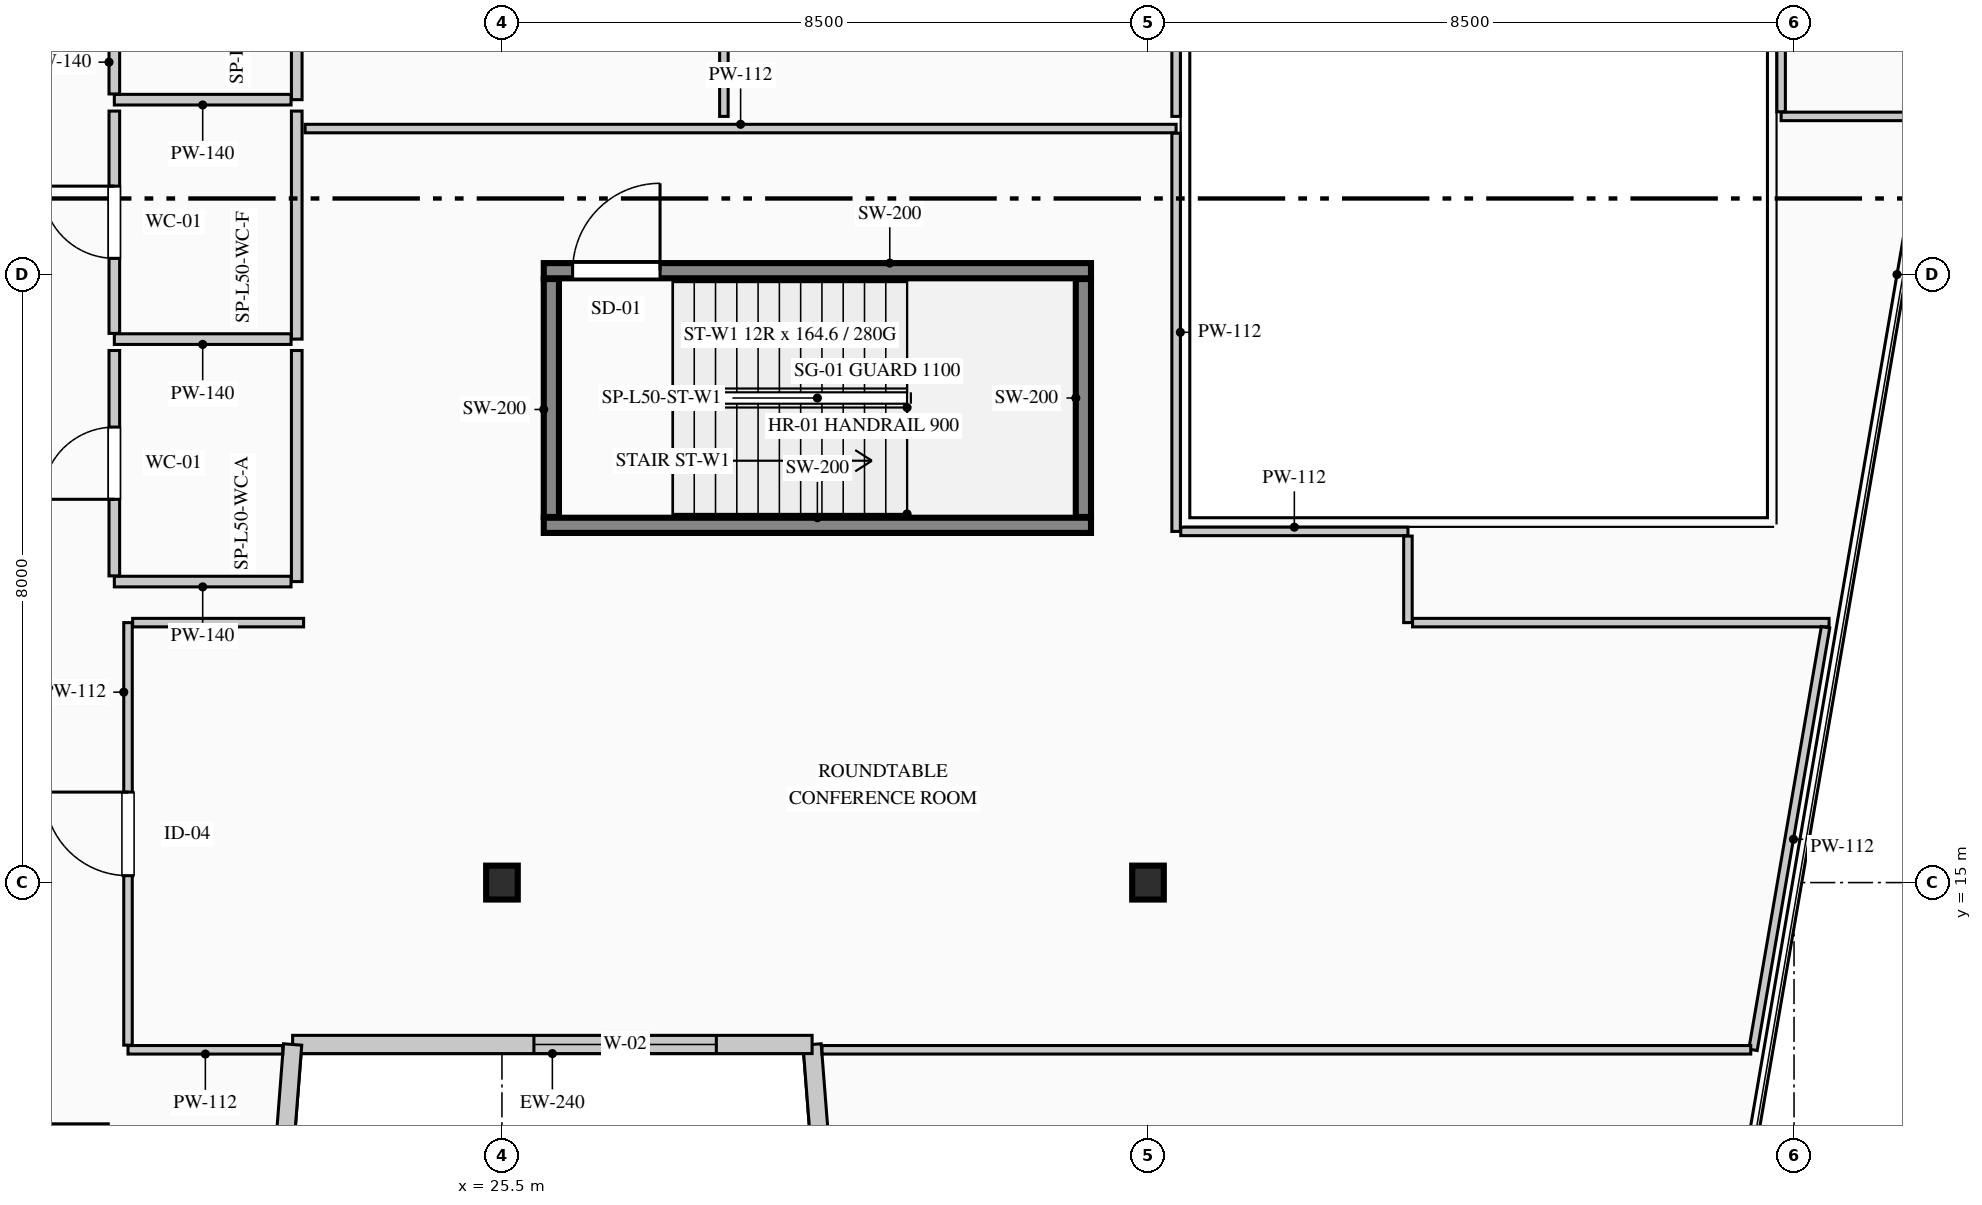
"""IFC4 building model, lengths in metres.
Left out: names, types, materials, properties, quantities, classifications, styles, units other than length and angle.
Written with IfcOpenShell. Run it as: python <this file> out.ifc"""

import sys

from ifc_helpers import new_model, si_unit, direction, frame, frame_2d, origin, origin_2d, place, context, subcontext, project, spatial, rectangle, i_section, extrude, element, fill, save


model = new_model("IFC4")
c1 = context("Model", 3, precision=1e-05, world=origin(), true_north=direction((0.0, 1.0)))
c2 = subcontext(c1, "Body", "Model", "MODEL_VIEW")
j1 = project(units=[si_unit("LENGTHUNIT", "METRE"), si_unit("PLANEANGLEUNIT", "RADIAN")], contexts=[c1])
p1 = place(None, origin())
s1 = spatial("IfcSite", under=j1, at=p1, CompositionType="ELEMENT")
p2 = place(p1, origin())
s2 = spatial("IfcBuilding", under=s1, at=p2, CompositionType="ELEMENT")
p3 = place(p2, frame((0.0, 0.0, 211.4)))
s3 = spatial("IfcBuildingStorey", under=s2, at=p3, CompositionType="ELEMENT", Elevation=211.4)
p4 = place(p3, frame((26.05, 19.7, 0.0), z_axis=(0.0, 0.0, 1.0), x_axis=(1.0, 0.0, 0.0)))
e1 = element("IfcWall", 1, at=p4, inside=s3, PredefinedType="SHEAR", context=c2, shape_type="SweptSolid", body=[
    extrude(rectangle(XDim=7.2, YDim=0.2, at=frame_2d((3.6, 0.0))), origin(), (0.0, 0.0, 1.0), 3.95),
])
p5 = place(p3, frame((26.05, 23.05, 0.0), z_axis=(0.0, 0.0, 1.0), x_axis=(1.0, 0.0, 0.0)))
e2 = element("IfcWall", 2, at=p5, inside=s3, PredefinedType="SHEAR", context=c2, shape_type="SweptSolid", body=[
    extrude(rectangle(XDim=7.2, YDim=0.2, at=frame_2d((3.6, 0.0))), origin(), (0.0, 0.0, 1.0), 3.95),
])
p6 = place(p5, frame((0.38, 0.0, 0.0)))
e3 = element("IfcOpeningElement", 3, at=p6, cuts=e2, PredefinedType="OPENING", context=c2, shape_type="SweptSolid", body=[
    extrude(rectangle(XDim=1.15, YDim=2.2, at=frame_2d((0.575, 1.1))), frame((0.0, 0.11, 0.0), z_axis=(0.0, -1.0, 0.0), x_axis=(1.0, 0.0, 0.0)), (0.0, 0.0, 1.0), 0.22),
])
for number, where, z_axis, x_axis in (
    (4, (26.15, 19.81, 0.0), (0.0, 0.0, 1.0), (0.0, 1.0, 0.0)),
    (5, (33.15, 19.81, 0.0), (0.0, 0.0, 1.0), (0.0, 1.0, 0.0)),
):
    element("IfcWall", number, at=place(p3, frame(where, z_axis=z_axis, x_axis=x_axis)), inside=s3, PredefinedType="SHEAR", context=c2, shape_type="SweptSolid", body=[
        extrude(rectangle(XDim=3.13, YDim=0.2, at=frame_2d((1.565, 0.0))), origin(), (0.0, 0.0, 1.0), 3.95),
    ])
for number, where, z_axis, x_axis in (
    (6, (25.5, 15.0, 0.0), (0.0, 0.0, 1.0), (1.0, 0.0, 0.0)),
    (7, (34.0, 15.0, 0.0), (0.0, 0.0, 1.0), (1.0, 0.0, 0.0)),
):
    element("IfcColumn", number, at=place(p3, frame(where, z_axis=z_axis, x_axis=x_axis)), inside=s3, PredefinedType="COLUMN", context=c2, shape_type="SweptSolid", body=[
        extrude(i_section(OverallWidth=0.416, OverallDepth=0.446, WebThickness=0.039, FlangeThickness=0.063, FilletRadius=0.015, at=origin_2d()), origin(), (0.0, 0.0, 1.0), 3.95),
    ])
p7 = place(p3, frame((30.381, 2.62, 0.0), z_axis=(0.0, 0.0, 1.0), x_axis=(-0.077816860153, 0.996967670627, 0.0)))
e8 = element("IfcWall", 8, at=p7, inside=s3, PredefinedType="STANDARD", context=c2, shape_type="SweptSolid", body=[
    extrude(rectangle(XDim=10.281, YDim=0.24, at=frame_2d((5.141, 0.0))), origin(), (0.0, 0.0, 1.0), 3.7),
])
p8 = place(p7, frame((5.38, 0.0, 0.9)))
e9 = element("IfcOpeningElement", 9, at=p8, cuts=e8, PredefinedType="OPENING", context=c2, shape_type="SweptSolid", body=[
    extrude(rectangle(XDim=2.4, YDim=2.1, at=frame_2d((1.2, 1.05))), frame((0.0, 0.13, 0.0), z_axis=(0.0, -1.0, 0.0), x_axis=(1.0, 0.0, 0.0)), (0.0, 0.0, 1.0), 0.26),
])
p9 = place(p3, frame((29.581, 12.87, 0.0), z_axis=(0.0, 0.0, 1.0), x_axis=(-1.0, 0.0, 0.0)))
e10 = element("IfcWall", 10, at=p9, inside=s3, PredefinedType="STANDARD", context=c2, shape_type="SweptSolid", body=[
    extrude(rectangle(XDim=6.834, YDim=0.24, at=frame_2d((3.417, 0.0))), origin(), (0.0, 0.0, 1.0), 3.7),
])
p10 = place(p9, frame((1.26, 0.0, 0.9)))
e11 = element("IfcOpeningElement", 11, at=p10, cuts=e10, PredefinedType="OPENING", context=c2, shape_type="SweptSolid", body=[
    extrude(rectangle(XDim=2.4, YDim=2.1, at=frame_2d((1.2, 1.05))), frame((0.0, 0.13, 0.0), z_axis=(0.0, -1.0, 0.0), x_axis=(1.0, 0.0, 0.0)), (0.0, 0.0, 1.0), 0.26),
])
p11 = place(p3, frame((22.746, 12.87, 0.0), z_axis=(0.0, 0.0, 1.0), x_axis=(-0.077816860153, -0.996967670627, 0.0)))
e12 = element("IfcWall", 12, at=p11, inside=s3, PredefinedType="STANDARD", context=c2, shape_type="SweptSolid", body=[
    extrude(rectangle(XDim=10.281, YDim=0.24, at=frame_2d((5.141, 0.0))), origin(), (0.0, 0.0, 1.0), 3.7),
])
p12 = place(p11, frame((2.501, 0.0, 0.9)))
e13 = element("IfcOpeningElement", 13, at=p12, cuts=e12, PredefinedType="OPENING", context=c2, shape_type="SweptSolid", body=[
    extrude(rectangle(XDim=2.4, YDim=2.1, at=frame_2d((1.2, 1.05))), frame((0.0, 0.13, 0.0), z_axis=(0.0, -1.0, 0.0), x_axis=(1.0, 0.0, 0.0)), (0.0, 0.0, 1.0), 0.26),
])
p13 = place(p3, frame((22.8, 28.95, 0.0), z_axis=(0.0, 0.0, 1.0), x_axis=(0.0, -1.0, 0.0)))
e14 = element("IfcWall", 14, at=p13, inside=s3, PredefinedType="PARTITIONING", context=c2, shape_type="SweptSolid", body=[
    extrude(rectangle(XDim=3.65, YDim=0.14, at=frame_2d((1.825, 0.0))), origin(), (0.0, 0.0, 1.0), 3.325),
])
p14 = place(p3, frame((22.725, 25.3, 0.0), z_axis=(0.0, 0.0, 1.0), x_axis=(-1.0, 0.0, 0.0)))
e15 = element("IfcWall", 15, at=p14, inside=s3, PredefinedType="PARTITIONING", context=c2, shape_type="SweptSolid", body=[
    extrude(rectangle(XDim=2.325, YDim=0.14, at=frame_2d((1.163, 0.0))), origin(), (0.0, 0.0, 1.0), 3.7),
])
p15 = place(p3, frame((20.4, 25.375, 0.0), z_axis=(0.0, 0.0, 1.0), x_axis=(0.0, 1.0, 0.0)))
e16 = element("IfcWall", 16, at=p15, inside=s3, PredefinedType="PARTITIONING", context=c2, shape_type="SweptSolid", body=[
    extrude(rectangle(XDim=3.575, YDim=0.14, at=frame_2d((1.788, 0.0))), origin(), (0.0, 0.0, 1.0), 3.7),
])
p16 = place(p15, frame((1.312, 0.0, 0.0)))
e17 = element("IfcOpeningElement", 17, at=p16, cuts=e16, PredefinedType="OPENING", context=c2, shape_type="SweptSolid", body=[
    extrude(rectangle(XDim=0.95, YDim=2.15, at=frame_2d((0.475, 1.075))), frame((0.0, 0.08, 0.0), z_axis=(0.0, -1.0, 0.0), x_axis=(1.0, 0.0, 0.0)), (0.0, 0.0, 1.0), 0.16),
])
p17 = place(p3, frame((22.8, 25.15, 0.0), z_axis=(0.0, 0.0, 1.0), x_axis=(0.0, -1.0, 0.0)))
e18 = element("IfcWall", 18, at=p17, inside=s3, PredefinedType="PARTITIONING", context=c2, shape_type="SweptSolid", body=[
    extrude(rectangle(XDim=3.0, YDim=0.14, at=frame_2d((1.5, 0.0))), origin(), (0.0, 0.0, 1.0), 3.325),
])
p18 = place(p3, frame((22.725, 22.15, 0.0), z_axis=(0.0, 0.0, 1.0), x_axis=(-1.0, 0.0, 0.0)))
e19 = element("IfcWall", 19, at=p18, inside=s3, PredefinedType="PARTITIONING", context=c2, shape_type="SweptSolid", body=[
    extrude(rectangle(XDim=2.325, YDim=0.14, at=frame_2d((1.163, 0.0))), origin(), (0.0, 0.0, 1.0), 3.7),
])
p19 = place(p3, frame((20.4, 22.225, 0.0), z_axis=(0.0, 0.0, 1.0), x_axis=(0.0, 1.0, 0.0)))
e20 = element("IfcWall", 20, at=p19, inside=s3, PredefinedType="PARTITIONING", context=c2, shape_type="SweptSolid", body=[
    extrude(rectangle(XDim=2.925, YDim=0.14, at=frame_2d((1.462, 0.0))), origin(), (0.0, 0.0, 1.0), 3.7),
])
p20 = place(p19, frame((0.988, 0.0, 0.0)))
e21 = element("IfcOpeningElement", 21, at=p20, cuts=e20, PredefinedType="OPENING", context=c2, shape_type="SweptSolid", body=[
    extrude(rectangle(XDim=0.95, YDim=2.15, at=frame_2d((0.475, 1.075))), frame((0.0, 0.08, 0.0), z_axis=(0.0, -1.0, 0.0), x_axis=(1.0, 0.0, 0.0)), (0.0, 0.0, 1.0), 0.16),
])
p21 = place(p3, frame((22.8, 22.0, 0.0), z_axis=(0.0, 0.0, 1.0), x_axis=(0.0, -1.0, 0.0)))
e22 = element("IfcWall", 22, at=p21, inside=s3, PredefinedType="PARTITIONING", context=c2, shape_type="SweptSolid", body=[
    extrude(rectangle(XDim=3.04, YDim=0.14, at=frame_2d((1.52, 0.0))), origin(), (0.0, 0.0, 1.0), 3.325),
])
p22 = place(p3, frame((22.725, 18.96, 0.0), z_axis=(0.0, 0.0, 1.0), x_axis=(-1.0, 0.0, 0.0)))
e23 = element("IfcWall", 23, at=p22, inside=s3, PredefinedType="PARTITIONING", context=c2, shape_type="SweptSolid", body=[
    extrude(rectangle(XDim=2.325, YDim=0.14, at=frame_2d((1.163, 0.0))), origin(), (0.0, 0.0, 1.0), 3.7),
])
p23 = place(p3, frame((20.4, 19.035, 0.0), z_axis=(0.0, 0.0, 1.0), x_axis=(0.0, 1.0, 0.0)))
e24 = element("IfcWall", 24, at=p23, inside=s3, PredefinedType="PARTITIONING", context=c2, shape_type="SweptSolid", body=[
    extrude(rectangle(XDim=2.965, YDim=0.14, at=frame_2d((1.482, 0.0))), origin(), (0.0, 0.0, 1.0), 3.7),
])
p24 = place(p23, frame((1.008, 0.0, 0.0)))
e25 = element("IfcOpeningElement", 25, at=p24, cuts=e24, PredefinedType="OPENING", context=c2, shape_type="SweptSolid", body=[
    extrude(rectangle(XDim=0.95, YDim=2.15, at=frame_2d((0.475, 1.075))), frame((0.0, 0.08, 0.0), z_axis=(0.0, -1.0, 0.0), x_axis=(1.0, 0.0, 0.0)), (0.0, 0.0, 1.0), 0.16),
])
p25 = place(p3, frame((11.341, 11.77, 0.0), z_axis=(0.0, 0.0, 1.0), x_axis=(1.0, 0.0, 0.0)))
e26 = element("IfcWall", 26, at=p25, inside=s3, PredefinedType="PARTITIONING", context=c2, shape_type="SweptSolid", body=[
    extrude(rectangle(XDim=8.979, YDim=0.112, at=frame_2d((4.49, 0.0))), origin(), (0.0, 0.0, 1.0), 3.7),
])
p26 = place(p25, frame((3.939, 0.0, 0.0)))
e27 = element("IfcOpeningElement", 27, at=p26, cuts=e26, PredefinedType="OPENING", context=c2, shape_type="SweptSolid", body=[
    extrude(rectangle(XDim=1.1, YDim=2.2, at=frame_2d((0.55, 1.1))), frame((0.0, 0.066, 0.0), z_axis=(0.0, -1.0, 0.0), x_axis=(1.0, 0.0, 0.0)), (0.0, 0.0, 1.0), 0.132),
])
p27 = place(p3, frame((22.615, 12.8, 0.0), z_axis=(0.0, 0.0, 1.0), x_axis=(-1.0, 0.0, 0.0)))
e28 = element("IfcWall", 28, at=p27, inside=s3, PredefinedType="PARTITIONING", context=c2, shape_type="SweptSolid", body=[
    extrude(rectangle(XDim=2.035, YDim=0.112, at=frame_2d((1.018, 0.0))), origin(), (0.0, 0.0, 1.0), 3.7),
])
p28 = place(p3, frame((20.58, 12.861, 0.0), z_axis=(0.0, 0.0, 1.0), x_axis=(0.0, 1.0, 0.0)))
e29 = element("IfcWall", 29, at=p28, inside=s3, PredefinedType="PARTITIONING", context=c2, shape_type="SweptSolid", body=[
    extrude(rectangle(XDim=5.559, YDim=0.112, at=frame_2d((2.779, 0.0))), origin(), (0.0, 0.0, 1.0), 3.7),
])
p29 = place(p28, frame((2.229, 0.0, 0.0)))
e30 = element("IfcOpeningElement", 30, at=p29, cuts=e29, PredefinedType="OPENING", context=c2, shape_type="SweptSolid", body=[
    extrude(rectangle(XDim=1.1, YDim=2.2, at=frame_2d((0.55, 1.1))), frame((0.0, 0.066, 0.0), z_axis=(0.0, -1.0, 0.0), x_axis=(1.0, 0.0, 0.0)), (0.0, 0.0, 1.0), 0.132),
])
p30 = place(p3, frame((20.641, 18.42, 0.0), z_axis=(0.0, 0.0, 1.0), x_axis=(1.0, 0.0, 0.0)))
e31 = element("IfcWall", 31, at=p30, inside=s3, PredefinedType="PARTITIONING", context=c2, shape_type="SweptSolid", body=[
    extrude(rectangle(XDim=2.249, YDim=0.112, at=frame_2d((1.125, 0.0))), origin(), (0.0, 0.0, 1.0), 3.7),
])
p31 = place(p3, frame((22.91, 24.92, 0.0), z_axis=(0.0, 0.0, 1.0), x_axis=(1.0, 0.0, 0.0)))
e32 = element("IfcWall", 32, at=p31, inside=s3, PredefinedType="PARTITIONING", context=c2, shape_type="SweptSolid", body=[
    extrude(rectangle(XDim=11.46, YDim=0.112, at=frame_2d((5.73, 0.0))), origin(), (0.0, 0.0, 1.0), 3.325),
])
p32 = place(p3, frame((34.37, 24.859, 0.0), z_axis=(0.0, 0.0, 1.0), x_axis=(0.0, -1.0, 0.0)))
e33 = element("IfcWall", 33, at=p32, inside=s3, PredefinedType="PARTITIONING", context=c2, shape_type="SweptSolid", body=[
    extrude(rectangle(XDim=5.239, YDim=0.112, at=frame_2d((2.619, 0.0))), origin(), (0.0, 0.0, 1.0), 3.7),
])
p33 = place(p3, frame((34.431, 19.62, 0.0), z_axis=(0.0, 0.0, 1.0), x_axis=(1.0, 0.0, 0.0)))
e34 = element("IfcWall", 34, at=p33, inside=s3, PredefinedType="PARTITIONING", context=c2, shape_type="SweptSolid", body=[
    extrude(rectangle(XDim=2.989, YDim=0.112, at=frame_2d((1.495, 0.0))), origin(), (0.0, 0.0, 1.0), 3.7),
])
p34 = place(p3, frame((37.42, 19.559, 0.0), z_axis=(0.0, 0.0, 1.0), x_axis=(0.0, -1.0, 0.0)))
e35 = element("IfcWall", 35, at=p34, inside=s3, PredefinedType="PARTITIONING", context=c2, shape_type="SweptSolid", body=[
    extrude(rectangle(XDim=1.139, YDim=0.112, at=frame_2d((0.57, 0.0))), origin(), (0.0, 0.0, 1.0), 3.7),
])
p35 = place(p3, frame((37.481, 18.42, 0.0), z_axis=(0.0, 0.0, 1.0), x_axis=(1.0, 0.0, 0.0)))
e36 = element("IfcWall", 36, at=p35, inside=s3, PredefinedType="PARTITIONING", context=c2, shape_type="SweptSolid", body=[
    extrude(rectangle(XDim=5.48, YDim=0.112, at=frame_2d((2.74, 0.0))), origin(), (0.0, 0.0, 1.0), 3.7),
])
p36 = place(p3, frame((42.915, 18.359, 0.0), z_axis=(0.0, 0.0, 1.0), x_axis=(-0.169247345334, -0.985573607651, 0.0)))
e37 = element("IfcWall", 37, at=p36, inside=s3, PredefinedType="PARTITIONING", context=c2, shape_type="SweptSolid", body=[
    extrude(rectangle(XDim=5.64, YDim=0.112, at=frame_2d((2.82, 0.0))), origin(), (0.0, 0.0, 1.0), 3.7),
])
p37 = place(p3, frame((41.93, 12.8, 0.0), z_axis=(0.0, 0.0, 1.0), x_axis=(-1.0, 0.0, 0.0)))
e38 = element("IfcWall", 38, at=p37, inside=s3, PredefinedType="PARTITIONING", context=c2, shape_type="SweptSolid", body=[
    extrude(rectangle(XDim=12.219, YDim=0.112, at=frame_2d((6.11, 0.0))), origin(), (0.0, 0.0, 1.0), 3.7),
])
p38 = place(p3, frame((28.42, 28.959, 0.0), z_axis=(0.0, 0.0, 1.0), x_axis=(0.0, -1.0, 0.0)))
e39 = element("IfcWall", 39, at=p38, inside=s3, PredefinedType="PARTITIONING", context=c2, shape_type="SweptSolid", body=[
    extrude(rectangle(XDim=3.879, YDim=0.112, at=frame_2d((1.939, 0.0))), origin(), (0.0, 0.0, 1.0), 3.7),
])
p39 = place(p3, frame((34.37, 28.6, 0.0), z_axis=(0.0, 0.0, 1.0), x_axis=(0.0, -1.0, 0.0)))
e40 = element("IfcWall", 40, at=p39, inside=s3, PredefinedType="PARTITIONING", context=c2, shape_type="SweptSolid", body=[
    extrude(rectangle(XDim=3.52, YDim=0.112, at=frame_2d((1.76, 0.0))), origin(), (0.0, 0.0, 1.0), 3.7),
])
p40 = place(p3, frame((44.041, 25.08, 0.0), z_axis=(0.0, 0.0, 1.0), x_axis=(-1.0, 0.0, 0.0)))
e41 = element("IfcWall", 41, at=p40, inside=s3, PredefinedType="PARTITIONING", context=c2, shape_type="SweptSolid", body=[
    extrude(rectangle(XDim=1.71, YDim=0.112, at=frame_2d((0.855, 0.0))), origin(), (0.0, 0.0, 1.0), 3.7),
])
p41 = place(p3, frame((42.33, 25.141, 0.0), z_axis=(0.0, 0.0, 1.0), x_axis=(0.0, 1.0, 0.0)))
e42 = element("IfcWall", 42, at=p41, inside=s3, PredefinedType="PARTITIONING", context=c2, shape_type="SweptSolid", body=[
    extrude(rectangle(XDim=3.489, YDim=0.112, at=frame_2d((1.744, 0.0))), origin(), (0.0, 0.0, 1.0), 3.7),
])
p42 = place(p10, origin())
e43 = element("IfcWindow", 43, at=p42, inside=s3, PartitioningType="DOUBLE_PANEL_VERTICAL", PredefinedType="WINDOW", context=c2, shape_type="SweptSolid", body=[
    extrude(rectangle(XDim=2.4, YDim=2.1, at=frame_2d((1.2, 1.05))), frame((0.0, 0.03, 0.0), z_axis=(0.0, -1.0, 0.0), x_axis=(1.0, 0.0, 0.0)), (0.0, 0.0, 1.0), 0.06),
])
fill(e11, e43)
p43 = place(p6, origin())
e44 = element("IfcDoor", 44, at=p43, inside=s3, OperationType="SINGLE_SWING_RIGHT", PredefinedType="DOOR", context=c2, shape_type="SweptSolid", body=[
    extrude(rectangle(XDim=1.15, YDim=2.2, at=frame_2d((0.575, 1.1))), frame((0.0, 0.025, 0.0), z_axis=(0.0, -1.0, 0.0), x_axis=(1.0, 0.0, 0.0)), (0.0, 0.0, 1.0), 0.05),
])
fill(e3, e44)
p44 = place(p20, origin())
e45 = element("IfcDoor", 45, at=p44, inside=s3, OperationType="SINGLE_SWING_RIGHT", PredefinedType="DOOR", context=c2, shape_type="SweptSolid", body=[
    extrude(rectangle(XDim=0.95, YDim=2.15, at=frame_2d((0.475, 1.075))), frame((0.0, 0.025, 0.0), z_axis=(0.0, -1.0, 0.0), x_axis=(1.0, 0.0, 0.0)), (0.0, 0.0, 1.0), 0.05),
])
fill(e21, e45)
p45 = place(p24, origin())
e46 = element("IfcDoor", 46, at=p45, inside=s3, OperationType="SINGLE_SWING_LEFT", PredefinedType="DOOR", context=c2, shape_type="SweptSolid", body=[
    extrude(rectangle(XDim=0.95, YDim=2.15, at=frame_2d((0.475, 1.075))), frame((0.0, 0.025, 0.0), z_axis=(0.0, -1.0, 0.0), x_axis=(1.0, 0.0, 0.0)), (0.0, 0.0, 1.0), 0.05),
])
fill(e25, e46)
p46 = place(p29, origin())
e47 = element("IfcDoor", 47, at=p46, inside=s3, OperationType="SINGLE_SWING_RIGHT", PredefinedType="DOOR", context=c2, shape_type="SweptSolid", body=[
    extrude(rectangle(XDim=1.1, YDim=2.2, at=frame_2d((0.55, 1.1))), frame((0.0, 0.025, 0.0), z_axis=(0.0, -1.0, 0.0), x_axis=(1.0, 0.0, 0.0)), (0.0, 0.0, 1.0), 0.05),
])
fill(e30, e47)
save(model, sys.argv[1])
